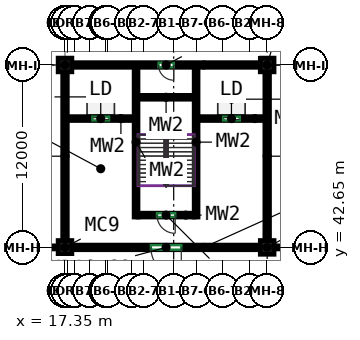
"""IFC4 building model, lengths in metres.
Left out: names, types, materials, properties, quantities, classifications, styles, units other than length and angle.
Written with IfcOpenShell. Run it as: python <this file> out.ifc"""

import sys

from ifc_helpers import new_model, si_unit, direction, frame, frame_2d, origin, origin_2d, place, context, subcontext, project, spatial, rectangle, extrude, source, transform, mapped, element, fill, save


model = new_model("IFC4")
c1 = context("Model", 3, precision=1e-05, world=origin(), true_north=direction((0.0, 1.0)))
c2 = subcontext(c1, "Body", "Model", "MODEL_VIEW")
j1 = project(units=[si_unit("LENGTHUNIT", "METRE"), si_unit("PLANEANGLEUNIT", "RADIAN")], contexts=[c1])
p1 = place(None, origin())
s1 = spatial("IfcSite", under=j1, at=p1, CompositionType="ELEMENT")
p2 = place(p1, origin())
s2 = spatial("IfcBuilding", under=s1, at=p2, CompositionType="ELEMENT")
p3 = place(p2, origin())
s3 = spatial("IfcBuildingStorey", under=s2, at=p3, CompositionType="ELEMENT", Elevation=0.0)
m1 = source(origin(), c2, "Body", "SweptSolid", [
    extrude(rectangle(XDim=0.9, YDim=0.9, at=origin_2d()), origin(), (0.0, 0.0, 1.0), 8.6),
])
for number, where, z_axis, x_axis in (
    (1, (17.35, 42.65, 0.0), (0.0, 0.0, 1.0), (1.0, 0.0, 0.0)),
    (2, (17.35, 54.65, 0.0), (0.0, 0.0, 1.0), (1.0, 0.0, 0.0)),
    (3, (30.65, 42.65, 0.0), (0.0, 0.0, 1.0), (1.0, 0.0, 0.0)),
    (4, (30.65, 54.65, 0.0), (0.0, 0.0, 1.0), (1.0, 0.0, 0.0)),
):
    element("IfcColumn", number, at=place(p3, frame(where, z_axis=z_axis, x_axis=x_axis)), inside=s3, PredefinedType="COLUMN", context=c2, shape_type="MappedRepresentation", body=[
        mapped(m1, transform((0.0, 0.0, 0.0))),
    ])
m2 = source(origin(), c2, "Body", "SweptSolid", [
    extrude(rectangle(XDim=12.4, YDim=0.3, at=frame_2d((6.2, 0.0))), origin(), (0.0, 0.0, 1.0), 7.7),
])
p4 = place(p3, frame((30.2, 54.65, 0.0), z_axis=(0.0, 0.0, 1.0), x_axis=(-1.0, 0.0, 0.0)))
e5 = element("IfcWall", 5, at=p4, inside=s3, PredefinedType="SHEAR", context=c2, shape_type="MappedRepresentation", body=[
    mapped(m2, transform((0.0, 0.0, 0.0))),
])
p5 = place(p4, frame((5.7, 0.0, 0.0)))
e6 = element("IfcOpeningElement", 6, at=p5, cuts=e5, PredefinedType="OPENING", context=c2, shape_type="SweptSolid", body=[
    extrude(rectangle(XDim=1.0, YDim=2.1, at=frame_2d((0.5, 1.05))), frame((0.0, 0.16, 0.0), z_axis=(0.0, -1.0, 0.0), x_axis=(1.0, 0.0, 0.0)), (0.0, 0.0, 1.0), 0.32),
])
p6 = place(p3, frame((30.2, 42.65, 0.0), z_axis=(0.0, 0.0, 1.0), x_axis=(-1.0, 0.0, 0.0)))
e7 = element("IfcWall", 7, at=p6, inside=s3, PredefinedType="SHEAR", context=c2, shape_type="MappedRepresentation", body=[
    mapped(m2, transform((0.0, 0.0, 0.0))),
])
p7 = place(p6, frame((5.2, 0.0, 0.0)))
e8 = element("IfcOpeningElement", 8, at=p7, cuts=e7, PredefinedType="OPENING", context=c2, shape_type="SweptSolid", body=[
    extrude(rectangle(XDim=2.0, YDim=2.4, at=frame_2d((1.0, 1.2))), frame((0.0, 0.16, 0.0), z_axis=(0.0, -1.0, 0.0), x_axis=(1.0, 0.0, 0.0)), (0.0, 0.0, 1.0), 0.32),
])
m3 = source(origin(), c2, "Body", "SweptSolid", [
    extrude(rectangle(XDim=11.1, YDim=0.3, at=frame_2d((5.55, 0.0))), origin(), (0.0, 0.0, 1.0), 7.7),
])
for number, where, z_axis, x_axis in (
    (9, (30.65, 54.2, 0.0), (0.0, 0.0, 1.0), (0.0, -1.0, 0.0)),
    (10, (17.35, 54.2, 0.0), (0.0, 0.0, 1.0), (0.0, -1.0, 0.0)),
):
    element("IfcWall", number, at=place(p3, frame(where, z_axis=z_axis, x_axis=x_axis)), inside=s3, PredefinedType="SHEAR", context=c2, shape_type="MappedRepresentation", body=[
        mapped(m3, transform((0.0, 0.0, 0.0))),
    ])
m4 = source(origin(), c2, "Body", "SweptSolid", [
    extrude(rectangle(XDim=9.85, YDim=0.25, at=frame_2d((4.925, 0.0))), origin(), (0.0, 0.0, 1.0), 8.6),
])
for number, where, z_axis, x_axis in (
    (11, (25.975, 54.5, 0.0), (0.0, 0.0, 1.0), (0.0, -1.0, 0.0)),
    (12, (22.025, 54.5, 0.0), (0.0, 0.0, 1.0), (0.0, -1.0, 0.0)),
):
    element("IfcWall", number, at=place(p3, frame(where, z_axis=z_axis, x_axis=x_axis)), inside=s3, PredefinedType="SHEAR", context=c2, shape_type="MappedRepresentation", body=[
        mapped(m4, transform((0.0, 0.0, 0.0))),
    ])
m5 = source(origin(), c2, "Body", "SweptSolid", [
    extrude(rectangle(XDim=3.7, YDim=0.25, at=frame_2d((1.85, 0.0))), origin(), (0.0, 0.0, 1.0), 8.6),
])
p8 = place(p3, frame((25.85, 52.525, 0.0), z_axis=(0.0, 0.0, 1.0), x_axis=(-1.0, 0.0, 0.0)))
e13 = element("IfcWall", 13, at=p8, inside=s3, PredefinedType="SHEAR", context=c2, shape_type="MappedRepresentation", body=[
    mapped(m5, transform((0.0, 0.0, 0.0))),
])
p9 = place(p3, frame((25.85, 44.775, 0.0), z_axis=(0.0, 0.0, 1.0), x_axis=(-1.0, 0.0, 0.0)))
e14 = element("IfcWall", 14, at=p9, inside=s3, PredefinedType="SHEAR", context=c2, shape_type="MappedRepresentation", body=[
    mapped(m5, transform((0.0, 0.0, 0.0))),
])
p10 = place(p9, frame((1.25, 0.0, 0.0)))
e15 = element("IfcOpeningElement", 15, at=p10, cuts=e14, PredefinedType="OPENING", context=c2, shape_type="SweptSolid", body=[
    extrude(rectangle(XDim=1.2, YDim=2.1, at=frame_2d((0.6, 1.05))), frame((0.0, 0.135, 0.0), z_axis=(0.0, -1.0, 0.0), x_axis=(1.0, 0.0, 0.0)), (0.0, 0.0, 1.0), 0.27),
])
m6 = source(origin(), c2, "Body", "SweptSolid", [
    extrude(rectangle(XDim=4.4, YDim=0.25, at=frame_2d((2.2, 0.0))), origin(), (0.0, 0.0, 1.0), 8.6),
])
p11 = place(p3, frame((30.5, 51.125, 0.0), z_axis=(0.0, 0.0, 1.0), x_axis=(-1.0, 0.0, 0.0)))
e16 = element("IfcWall", 16, at=p11, inside=s3, PredefinedType="SHEAR", context=c2, shape_type="MappedRepresentation", body=[
    mapped(m6, transform((0.0, 0.0, 0.0))),
])
p12 = place(p11, frame((1.65, 0.0, 0.0)))
e17 = element("IfcOpeningElement", 17, at=p12, cuts=e16, PredefinedType="OPENING", context=c2, shape_type="SweptSolid", body=[
    extrude(rectangle(XDim=1.1, YDim=2.1, at=frame_2d((0.55, 1.05))), frame((0.0, 0.135, 0.0), z_axis=(0.0, -1.0, 0.0), x_axis=(1.0, 0.0, 0.0)), (0.0, 0.0, 1.0), 0.27),
])
m7 = source(origin(), c2, "Body", "SweptSolid", [
    extrude(rectangle(XDim=4.15, YDim=0.25, at=frame_2d((2.075, 0.0))), origin(), (0.0, 0.0, 1.0), 8.6),
])
p13 = place(p3, frame((21.65, 51.125, 0.0), z_axis=(0.0, 0.0, 1.0), x_axis=(-1.0, 0.0, 0.0)))
e18 = element("IfcWall", 18, at=p13, inside=s3, PredefinedType="SHEAR", context=c2, shape_type="MappedRepresentation", body=[
    mapped(m7, transform((0.0, 0.0, 0.0))),
])
p14 = place(p13, frame((1.4, 0.0, 0.0)))
e19 = element("IfcOpeningElement", 19, at=p14, cuts=e18, PredefinedType="OPENING", context=c2, shape_type="SweptSolid", body=[
    extrude(rectangle(XDim=1.1, YDim=2.1, at=frame_2d((0.55, 1.05))), frame((0.0, 0.135, 0.0), z_axis=(0.0, -1.0, 0.0), x_axis=(1.0, 0.0, 0.0)), (0.0, 0.0, 1.0), 0.27),
])
m8 = source(origin(), c2, "Body", "SweptSolid", [
    extrude(rectangle(XDim=11.1, YDim=0.2, at=frame_2d((5.55, 0.0))), origin(), (0.0, 0.0, 1.0), 7.7),
])
p15 = place(p3, frame((5.8, 42.65, 0.0), z_axis=(0.0, 0.0, 1.0), x_axis=(1.0, 0.0, 0.0)))
e20 = element("IfcWall", 20, at=p15, inside=s3, PredefinedType="PARTITIONING", context=c2, shape_type="MappedRepresentation", body=[
    mapped(m8, transform((0.0, 0.0, 0.0))),
])
p16 = place(p15, frame((4.35, 0.0, 0.0)))
e21 = element("IfcOpeningElement", 21, at=p16, cuts=e20, PredefinedType="OPENING", context=c2, shape_type="SweptSolid", body=[
    extrude(rectangle(XDim=2.4, YDim=2.4, at=frame_2d((1.2, 1.2))), frame((0.0, 0.11, 0.0), z_axis=(0.0, -1.0, 0.0), x_axis=(1.0, 0.0, 0.0)), (0.0, 0.0, 1.0), 0.22),
])
m9 = source(origin(), c2, "Body", "SweptSolid", [
    extrude(rectangle(XDim=1.75, YDim=0.2, at=frame_2d((0.875, 0.0))), origin(), (0.0, 0.0, 1.0), 8.6),
])
p17 = place(p3, frame((17.35, 56.85, 0.0), z_axis=(0.0, 0.0, 1.0), x_axis=(0.0, -1.0, 0.0)))
e22 = element("IfcWall", 22, at=p17, inside=s3, PredefinedType="PARTITIONING", context=c2, shape_type="MappedRepresentation", body=[
    mapped(m9, transform((0.0, 0.0, 0.0))),
])
p18 = place(p3, frame((31.1, 42.65, 0.0), z_axis=(0.0, 0.0, 1.0), x_axis=(1.0, 0.0, 0.0)))
e23 = element("IfcWall", 23, at=p18, inside=s3, PredefinedType="PARTITIONING", context=c2, shape_type="MappedRepresentation", body=[
    mapped(m8, transform((0.0, 0.0, 0.0))),
])
p19 = place(p18, frame((4.35, 0.0, 0.0)))
e24 = element("IfcOpeningElement", 24, at=p19, cuts=e23, PredefinedType="OPENING", context=c2, shape_type="SweptSolid", body=[
    extrude(rectangle(XDim=2.4, YDim=2.4, at=frame_2d((1.2, 1.2))), frame((0.0, 0.11, 0.0), z_axis=(0.0, -1.0, 0.0), x_axis=(1.0, 0.0, 0.0)), (0.0, 0.0, 1.0), 0.22),
])
p20 = place(p10, origin())
e25 = element("IfcDoor", 25, at=p20, inside=s3, OperationType="DOUBLE_DOOR_SINGLE_SWING", PredefinedType="DOOR", context=c2, shape_type="SweptSolid", body=[
    extrude(rectangle(XDim=1.2, YDim=2.1, at=frame_2d((0.6, 1.05))), frame((0.0, 0.025, 0.0), z_axis=(0.0, -1.0, 0.0), x_axis=(1.0, 0.0, 0.0)), (0.0, 0.0, 1.0), 0.05),
])
fill(e15, e25)
p21 = place(p7, origin())
e26 = element("IfcDoor", 26, at=p21, inside=s3, OperationType="DOUBLE_DOOR_SINGLE_SWING", PredefinedType="DOOR", context=c2, shape_type="SweptSolid", body=[
    extrude(rectangle(XDim=2.0, YDim=2.4, at=frame_2d((1.0, 1.2))), frame((0.0, 0.025, 0.0), z_axis=(0.0, -1.0, 0.0), x_axis=(1.0, 0.0, 0.0)), (0.0, 0.0, 1.0), 0.05),
])
fill(e8, e26)
p22 = place(p12, origin())
e27 = element("IfcDoor", 27, at=p22, inside=s3, OperationType="SLIDING_TO_LEFT", PredefinedType="DOOR", context=c2, shape_type="SweptSolid", body=[
    extrude(rectangle(XDim=1.1, YDim=2.1, at=frame_2d((0.55, 1.05))), frame((0.0, 0.025, 0.0), z_axis=(0.0, -1.0, 0.0), x_axis=(1.0, 0.0, 0.0)), (0.0, 0.0, 1.0), 0.05),
])
fill(e17, e27)
p23 = place(p14, origin())
e28 = element("IfcDoor", 28, at=p23, inside=s3, OperationType="SLIDING_TO_LEFT", PredefinedType="DOOR", context=c2, shape_type="SweptSolid", body=[
    extrude(rectangle(XDim=1.1, YDim=2.1, at=frame_2d((0.55, 1.05))), frame((0.0, 0.025, 0.0), z_axis=(0.0, -1.0, 0.0), x_axis=(1.0, 0.0, 0.0)), (0.0, 0.0, 1.0), 0.05),
])
fill(e19, e28)
p24 = place(p5, origin())
e29 = element("IfcDoor", 29, at=p24, inside=s3, OperationType="SINGLE_SWING_LEFT", PredefinedType="DOOR", context=c2, shape_type="SweptSolid", body=[
    extrude(rectangle(XDim=1.0, YDim=2.1, at=frame_2d((0.5, 1.05))), frame((0.0, 0.025, 0.0), z_axis=(0.0, -1.0, 0.0), x_axis=(1.0, 0.0, 0.0)), (0.0, 0.0, 1.0), 0.05),
])
fill(e6, e29)
save(model, sys.argv[1])
